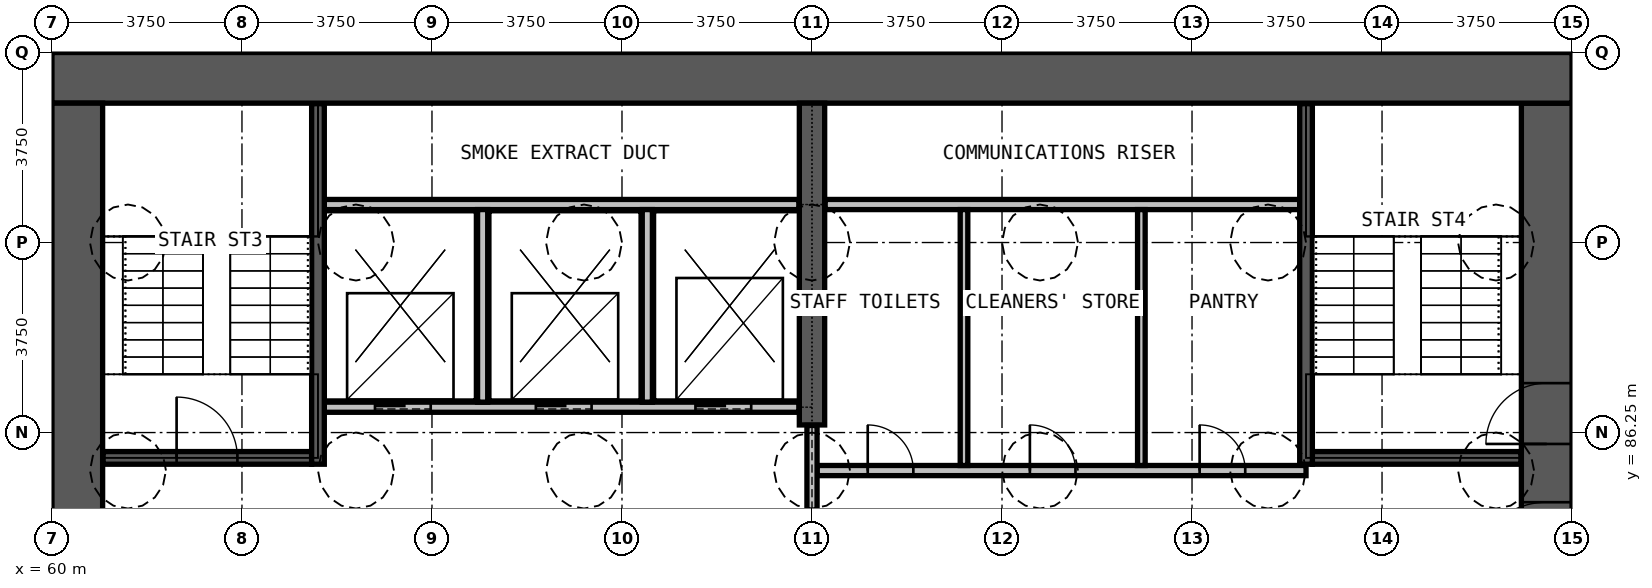
"""IFC4 building model, lengths in metres.
Left out: names, types, materials, properties, quantities, classifications, styles, units other than length and angle.
Written with IfcOpenShell. Run it as: python <this file> out.ifc"""

import sys

from ifc_helpers import new_model, si_unit, direction, frame, frame_2d, origin, place, context, subcontext, project, spatial, rectangle, extrude, element, fill, save


model = new_model("IFC4")
c1 = context("Model", 3, precision=1e-05, world=origin(), true_north=direction((0.0, 1.0)))
c2 = subcontext(c1, "Body", "Model", "MODEL_VIEW")
j1 = project(units=[si_unit("LENGTHUNIT", "METRE"), si_unit("PLANEANGLEUNIT", "RADIAN")], contexts=[c1])
p1 = place(None, origin())
s1 = spatial("IfcSite", under=j1, at=p1, CompositionType="ELEMENT")
p2 = place(p1, origin())
s2 = spatial("IfcBuilding", under=s1, at=p2, CompositionType="ELEMENT")
p3 = place(p2, frame((0.0, 0.0, -6.0)))
s3 = spatial("IfcBuildingStorey", under=s2, at=p3, CompositionType="ELEMENT", Elevation=-6.0)
p4 = place(p3, frame((89.5, 72.25, 0.0), z_axis=(0.0, 0.0, 1.0), x_axis=(0.0, 1.0, 0.0)))
e1 = element("IfcWall", 1, at=p4, inside=s3, PredefinedType="SHEAR", context=c2, shape_type="SweptSolid", body=[
    extrude(rectangle(XDim=20.5, YDim=1.0, at=frame_2d((10.25, 0.0))), origin(), (0.0, 0.0, 1.0), 6.0),
])
p5 = place(p4, frame((0.275, 0.0, 0.0)))
e2 = element("IfcOpeningElement", 2, at=p5, cuts=e1, PredefinedType="OPENING", context=c2, shape_type="SweptSolid", body=[
    extrude(rectangle(XDim=1.2, YDim=2.2, at=frame_2d((0.6, 1.1))), frame((0.0, 0.51, 0.0), z_axis=(0.0, -1.0, 0.0), x_axis=(1.0, 0.0, 0.0)), (0.0, 0.0, 1.0), 1.02),
])
p6 = place(p4, frame((13.775, 0.0, 0.0)))
e3 = element("IfcOpeningElement", 3, at=p6, cuts=e1, PredefinedType="OPENING", context=c2, shape_type="SweptSolid", body=[
    extrude(rectangle(XDim=1.2, YDim=2.2, at=frame_2d((0.6, 1.1))), frame((0.0, 0.51, 0.0), z_axis=(0.0, -1.0, 0.0), x_axis=(1.0, 0.0, 0.0)), (0.0, 0.0, 1.0), 1.02),
])
p7 = place(p4, frame((7.875, 0.0, 0.0)))
e4 = element("IfcOpeningElement", 4, at=p7, cuts=e1, PredefinedType="OPENING", context=c2, shape_type="SweptSolid", body=[
    extrude(rectangle(XDim=1.5, YDim=2.2, at=frame_2d((0.75, 1.1))), frame((0.0, 0.51, 0.0), z_axis=(0.0, -1.0, 0.0), x_axis=(1.0, 0.0, 0.0)), (0.0, 0.0, 1.0), 1.02),
])
p8 = place(p4, frame((11.125, 0.0, 0.0)))
e5 = element("IfcOpeningElement", 5, at=p8, cuts=e1, PredefinedType="OPENING", context=c2, shape_type="SweptSolid", body=[
    extrude(rectangle(XDim=1.5, YDim=2.2, at=frame_2d((0.75, 1.1))), frame((0.0, 0.51, 0.0), z_axis=(0.0, -1.0, 0.0), x_axis=(1.0, 0.0, 0.0)), (0.0, 0.0, 1.0), 1.02),
])
p9 = place(p3, frame((90.0, 93.25, 0.0), z_axis=(0.0, 0.0, 1.0), x_axis=(-1.0, 0.0, 0.0)))
e6 = element("IfcWall", 6, at=p9, inside=s3, PredefinedType="SHEAR", context=c2, shape_type="SweptSolid", body=[
    extrude(rectangle(XDim=30.0, YDim=1.0, at=frame_2d((15.0, 0.0))), origin(), (0.0, 0.0, 1.0), 6.0),
])
p10 = place(p3, frame((60.5, 92.75, 0.0), z_axis=(0.0, 0.0, 1.0), x_axis=(0.0, -1.0, 0.0)))
e7 = element("IfcWall", 7, at=p10, inside=s3, PredefinedType="SHEAR", context=c2, shape_type="SweptSolid", body=[
    extrude(rectangle(XDim=20.5, YDim=1.0, at=frame_2d((10.25, 0.0))), origin(), (0.0, 0.0, 1.0), 6.0),
])
p11 = place(p10, frame((19.025, 0.0, 0.0)))
e8 = element("IfcOpeningElement", 8, at=p11, cuts=e7, PredefinedType="OPENING", context=c2, shape_type="SweptSolid", body=[
    extrude(rectangle(XDim=1.2, YDim=2.2, at=frame_2d((0.6, 1.1))), frame((0.0, 0.51, 0.0), z_axis=(0.0, -1.0, 0.0), x_axis=(1.0, 0.0, 0.0)), (0.0, 0.0, 1.0), 1.02),
])
p12 = place(p10, frame((8.025, 0.0, 0.0)))
e9 = element("IfcOpeningElement", 9, at=p12, cuts=e7, PredefinedType="OPENING", context=c2, shape_type="SweptSolid", body=[
    extrude(rectangle(XDim=1.2, YDim=2.2, at=frame_2d((0.6, 1.1))), frame((0.0, 0.51, 0.0), z_axis=(0.0, -1.0, 0.0), x_axis=(1.0, 0.0, 0.0)), (0.0, 0.0, 1.0), 1.02),
])
p13 = place(p3, frame((75.0, 86.4, 0.0), z_axis=(0.0, 0.0, 1.0), x_axis=(0.0, 1.0, 0.0)))
e10 = element("IfcWall", 10, at=p13, inside=s3, PredefinedType="SHEAR", context=c2, shape_type="SweptSolid", body=[
    extrude(rectangle(XDim=6.35, YDim=0.5, at=frame_2d((3.175, 0.0))), origin(), (0.0, 0.0, 1.0), 6.0),
])
p14 = place(p3, frame((75.1, 85.5, 0.0), z_axis=(0.0, 0.0, 1.0), x_axis=(1.0, 0.0, 0.0)))
e11 = element("IfcWall", 11, at=p14, inside=s3, PredefinedType="PARTITIONING", context=c2, shape_type="SweptSolid", body=[
    extrude(rectangle(XDim=9.65, YDim=0.2, at=frame_2d((4.825, 0.0))), origin(), (0.0, 0.0, 1.0), 5.65),
])
p15 = place(p14, frame((1.0, 0.0, 0.0)))
e12 = element("IfcOpeningElement", 12, at=p15, cuts=e11, PredefinedType="OPENING", context=c2, shape_type="SweptSolid", body=[
    extrude(rectangle(XDim=0.9, YDim=2.2, at=frame_2d((0.45, 1.1))), frame((0.0, 0.11, 0.0), z_axis=(0.0, -1.0, 0.0), x_axis=(1.0, 0.0, 0.0)), (0.0, 0.0, 1.0), 0.22),
])
p16 = place(p14, frame((4.2, 0.0, 0.0)))
e13 = element("IfcOpeningElement", 13, at=p16, cuts=e11, PredefinedType="OPENING", context=c2, shape_type="SweptSolid", body=[
    extrude(rectangle(XDim=0.9, YDim=2.2, at=frame_2d((0.45, 1.1))), frame((0.0, 0.11, 0.0), z_axis=(0.0, -1.0, 0.0), x_axis=(1.0, 0.0, 0.0)), (0.0, 0.0, 1.0), 0.22),
])
p17 = place(p14, frame((7.55, 0.0, 0.0)))
e14 = element("IfcOpeningElement", 14, at=p17, cuts=e11, PredefinedType="OPENING", context=c2, shape_type="SweptSolid", body=[
    extrude(rectangle(XDim=0.9, YDim=2.2, at=frame_2d((0.45, 1.1))), frame((0.0, 0.11, 0.0), z_axis=(0.0, -1.0, 0.0), x_axis=(1.0, 0.0, 0.0)), (0.0, 0.0, 1.0), 0.22),
])
p18 = place(p3, frame((75.26, 90.75, 0.0), z_axis=(0.0, 0.0, 1.0), x_axis=(1.0, 0.0, 0.0)))
e15 = element("IfcWall", 15, at=p18, inside=s3, PredefinedType="PARTITIONING", context=c2, shape_type="SweptSolid", body=[
    extrude(rectangle(XDim=9.365, YDim=0.2, at=frame_2d((4.683, 0.0))), origin(), (0.0, 0.0, 1.0), 5.65),
])
p19 = place(p3, frame((75.0, 84.01, 0.0), z_axis=(0.0, 0.0, 1.0), x_axis=(0.0, 1.0, 0.0)))
e16 = element("IfcWall", 16, at=p19, inside=s3, PredefinedType="PARTITIONING", context=c2, shape_type="SweptSolid", body=[
    extrude(rectangle(XDim=2.38, YDim=0.2, at=frame_2d((1.19, 0.0))), origin(), (0.0, 0.0, 1.0), 2.4),
])
for number, where, z_axis, x_axis in (
    (17, (78.0, 85.6, 0.0), (0.0, 0.0, 1.0), (0.0, 1.0, 0.0)),
    (18, (81.5, 85.6, 0.0), (0.0, 0.0, 1.0), (0.0, 1.0, 0.0)),
):
    element("IfcWall", number, at=place(p3, frame(where, z_axis=z_axis, x_axis=x_axis)), inside=s3, PredefinedType="PARTITIONING", context=c2, shape_type="SweptSolid", body=[
        extrude(rectangle(XDim=5.05, YDim=0.15, at=frame_2d((2.525, 0.0))), origin(), (0.0, 0.0, 1.0), 5.65),
    ])
p20 = place(p3, frame((65.375, 86.75, 0.0), z_axis=(0.0, 0.0, 1.0), x_axis=(1.0, 0.0, 0.0)))
e19 = element("IfcWall", 19, at=p20, inside=s3, PredefinedType="PARTITIONING", context=c2, shape_type="SweptSolid", body=[
    extrude(rectangle(XDim=9.365, YDim=0.2, at=frame_2d((4.683, 0.0))), origin(), (0.0, 0.0, 1.0), 5.65),
])
p21 = place(p20, frame((1.0, 0.0, 0.0)))
e20 = element("IfcOpeningElement", 20, at=p21, cuts=e19, PredefinedType="OPENING", context=c2, shape_type="SweptSolid", body=[
    extrude(rectangle(XDim=1.1, YDim=2.2, at=frame_2d((0.55, 1.1))), frame((0.0, 0.11, 0.0), z_axis=(0.0, -1.0, 0.0), x_axis=(1.0, 0.0, 0.0)), (0.0, 0.0, 1.0), 0.22),
])
p22 = place(p20, frame((4.175, 0.0, 0.0)))
e21 = element("IfcOpeningElement", 21, at=p22, cuts=e19, PredefinedType="OPENING", context=c2, shape_type="SweptSolid", body=[
    extrude(rectangle(XDim=1.1, YDim=2.2, at=frame_2d((0.55, 1.1))), frame((0.0, 0.11, 0.0), z_axis=(0.0, -1.0, 0.0), x_axis=(1.0, 0.0, 0.0)), (0.0, 0.0, 1.0), 0.22),
])
p23 = place(p20, frame((7.325, 0.0, 0.0)))
e22 = element("IfcOpeningElement", 22, at=p23, cuts=e19, PredefinedType="OPENING", context=c2, shape_type="SweptSolid", body=[
    extrude(rectangle(XDim=1.1, YDim=2.2, at=frame_2d((0.55, 1.1))), frame((0.0, 0.11, 0.0), z_axis=(0.0, -1.0, 0.0), x_axis=(1.0, 0.0, 0.0)), (0.0, 0.0, 1.0), 0.22),
])
p24 = place(p3, frame((65.375, 90.75, 0.0), z_axis=(0.0, 0.0, 1.0), x_axis=(1.0, 0.0, 0.0)))
e23 = element("IfcWall", 23, at=p24, inside=s3, PredefinedType="PARTITIONING", context=c2, shape_type="SweptSolid", body=[
    extrude(rectangle(XDim=9.365, YDim=0.2, at=frame_2d((4.683, 0.0))), origin(), (0.0, 0.0, 1.0), 5.65),
])
for number, where, z_axis, x_axis in (
    (24, (68.5, 86.85, 0.0), (0.0, 0.0, 1.0), (0.0, 1.0, 0.0)),
    (25, (71.75, 86.85, 0.0), (0.0, 0.0, 1.0), (0.0, 1.0, 0.0)),
):
    element("IfcWall", number, at=place(p3, frame(where, z_axis=z_axis, x_axis=x_axis)), inside=s3, PredefinedType="PARTITIONING", context=c2, shape_type="SweptSolid", body=[
        extrude(rectangle(XDim=3.8, YDim=0.2, at=frame_2d((1.9, 0.0))), origin(), (0.0, 0.0, 1.0), 5.65),
    ])
p25 = place(p3, frame((61.01, 85.75, 0.0), z_axis=(0.0, 0.0, 1.0), x_axis=(1.0, 0.0, 0.0)))
e26 = element("IfcWall", 26, at=p25, inside=s3, PredefinedType="PARTITIONING", context=c2, shape_type="SweptSolid", body=[
    extrude(rectangle(XDim=4.115, YDim=0.25, at=frame_2d((2.058, 0.0))), origin(), (0.0, 0.0, 1.0), 5.65),
])
p26 = place(p25, frame((1.45, 0.0, 0.0)))
e27 = element("IfcOpeningElement", 27, at=p26, cuts=e26, PredefinedType="OPENING", context=c2, shape_type="SweptSolid", body=[
    extrude(rectangle(XDim=1.2, YDim=2.2, at=frame_2d((0.6, 1.1))), frame((0.0, 0.135, 0.0), z_axis=(0.0, -1.0, 0.0), x_axis=(1.0, 0.0, 0.0)), (0.0, 0.0, 1.0), 0.27),
])
p27 = place(p3, frame((84.875, 85.75, 0.0), z_axis=(0.0, 0.0, 1.0), x_axis=(1.0, 0.0, 0.0)))
e28 = element("IfcWall", 28, at=p27, inside=s3, PredefinedType="PARTITIONING", context=c2, shape_type="SweptSolid", body=[
    extrude(rectangle(XDim=4.115, YDim=0.25, at=frame_2d((2.058, 0.0))), origin(), (0.0, 0.0, 1.0), 5.65),
])
for number, where, z_axis, x_axis in (
    (29, (65.25, 85.625, 0.0), (0.0, 0.0, 1.0), (0.0, 1.0, 0.0)),
    (30, (84.75, 85.625, 0.0), (0.0, 0.0, 1.0), (0.0, 1.0, 0.0)),
):
    element("IfcWall", number, at=place(p3, frame(where, z_axis=z_axis, x_axis=x_axis)), inside=s3, PredefinedType="PARTITIONING", context=c2, shape_type="SweptSolid", body=[
        extrude(rectangle(XDim=7.115, YDim=0.25, at=frame_2d((3.558, 0.0))), origin(), (0.0, 0.0, 1.0), 5.65),
    ])
p28 = place(p21, origin())
e31 = element("IfcDoor", 31, at=p28, inside=s3, OperationType="DOUBLE_DOOR_SLIDING", PredefinedType="DOOR", context=c2, shape_type="SweptSolid", body=[
    extrude(rectangle(XDim=1.1, YDim=2.2, at=frame_2d((0.55, 1.1))), frame((0.0, 0.025, 0.0), z_axis=(0.0, -1.0, 0.0), x_axis=(1.0, 0.0, 0.0)), (0.0, 0.0, 1.0), 0.05),
])
fill(e20, e31)
p29 = place(p22, origin())
e32 = element("IfcDoor", 32, at=p29, inside=s3, OperationType="DOUBLE_DOOR_SLIDING", PredefinedType="DOOR", context=c2, shape_type="SweptSolid", body=[
    extrude(rectangle(XDim=1.1, YDim=2.2, at=frame_2d((0.55, 1.1))), frame((0.0, 0.025, 0.0), z_axis=(0.0, -1.0, 0.0), x_axis=(1.0, 0.0, 0.0)), (0.0, 0.0, 1.0), 0.05),
])
fill(e21, e32)
p30 = place(p23, origin())
e33 = element("IfcDoor", 33, at=p30, inside=s3, OperationType="DOUBLE_DOOR_SLIDING", PredefinedType="DOOR", context=c2, shape_type="SweptSolid", body=[
    extrude(rectangle(XDim=1.1, YDim=2.2, at=frame_2d((0.55, 1.1))), frame((0.0, 0.025, 0.0), z_axis=(0.0, -1.0, 0.0), x_axis=(1.0, 0.0, 0.0)), (0.0, 0.0, 1.0), 0.05),
])
fill(e22, e33)
p31 = place(p26, origin())
e34 = element("IfcDoor", 34, at=p31, inside=s3, OperationType="SINGLE_SWING_RIGHT", PredefinedType="DOOR", context=c2, shape_type="SweptSolid", body=[
    extrude(rectangle(XDim=1.2, YDim=2.2, at=frame_2d((0.6, 1.1))), frame((0.0, 0.025, 0.0), z_axis=(0.0, -1.0, 0.0), x_axis=(1.0, 0.0, 0.0)), (0.0, 0.0, 1.0), 0.05),
])
fill(e27, e34)
p32 = place(p6, origin())
e35 = element("IfcDoor", 35, at=p32, inside=s3, OperationType="SINGLE_SWING_LEFT", PredefinedType="DOOR", context=c2, shape_type="SweptSolid", body=[
    extrude(rectangle(XDim=1.2, YDim=2.2, at=frame_2d((0.6, 1.1))), frame((0.0, 0.025, 0.0), z_axis=(0.0, -1.0, 0.0), x_axis=(1.0, 0.0, 0.0)), (0.0, 0.0, 1.0), 0.05),
])
fill(e3, e35)
p33 = place(p8, origin())
e36 = element("IfcDoor", 36, at=p33, inside=s3, OperationType="DOUBLE_DOOR_SINGLE_SWING", PredefinedType="DOOR", context=c2, shape_type="SweptSolid", body=[
    extrude(rectangle(XDim=1.5, YDim=2.2, at=frame_2d((0.75, 1.1))), frame((0.0, 0.025, 0.0), z_axis=(0.0, -1.0, 0.0), x_axis=(1.0, 0.0, 0.0)), (0.0, 0.0, 1.0), 0.05),
])
fill(e5, e36)
p34 = place(p15, origin())
e37 = element("IfcDoor", 37, at=p34, inside=s3, OperationType="SINGLE_SWING_LEFT", PredefinedType="DOOR", context=c2, shape_type="SweptSolid", body=[
    extrude(rectangle(XDim=0.9, YDim=2.2, at=frame_2d((0.45, 1.1))), frame((0.0, 0.025, 0.0), z_axis=(0.0, -1.0, 0.0), x_axis=(1.0, 0.0, 0.0)), (0.0, 0.0, 1.0), 0.05),
])
fill(e12, e37)
p35 = place(p16, origin())
e38 = element("IfcDoor", 38, at=p35, inside=s3, OperationType="SINGLE_SWING_LEFT", PredefinedType="DOOR", context=c2, shape_type="SweptSolid", body=[
    extrude(rectangle(XDim=0.9, YDim=2.2, at=frame_2d((0.45, 1.1))), frame((0.0, 0.025, 0.0), z_axis=(0.0, -1.0, 0.0), x_axis=(1.0, 0.0, 0.0)), (0.0, 0.0, 1.0), 0.05),
])
fill(e13, e38)
p36 = place(p17, origin())
e39 = element("IfcDoor", 39, at=p36, inside=s3, OperationType="SINGLE_SWING_LEFT", PredefinedType="DOOR", context=c2, shape_type="SweptSolid", body=[
    extrude(rectangle(XDim=0.9, YDim=2.2, at=frame_2d((0.45, 1.1))), frame((0.0, 0.025, 0.0), z_axis=(0.0, -1.0, 0.0), x_axis=(1.0, 0.0, 0.0)), (0.0, 0.0, 1.0), 0.05),
])
fill(e14, e39)
save(model, sys.argv[1])
